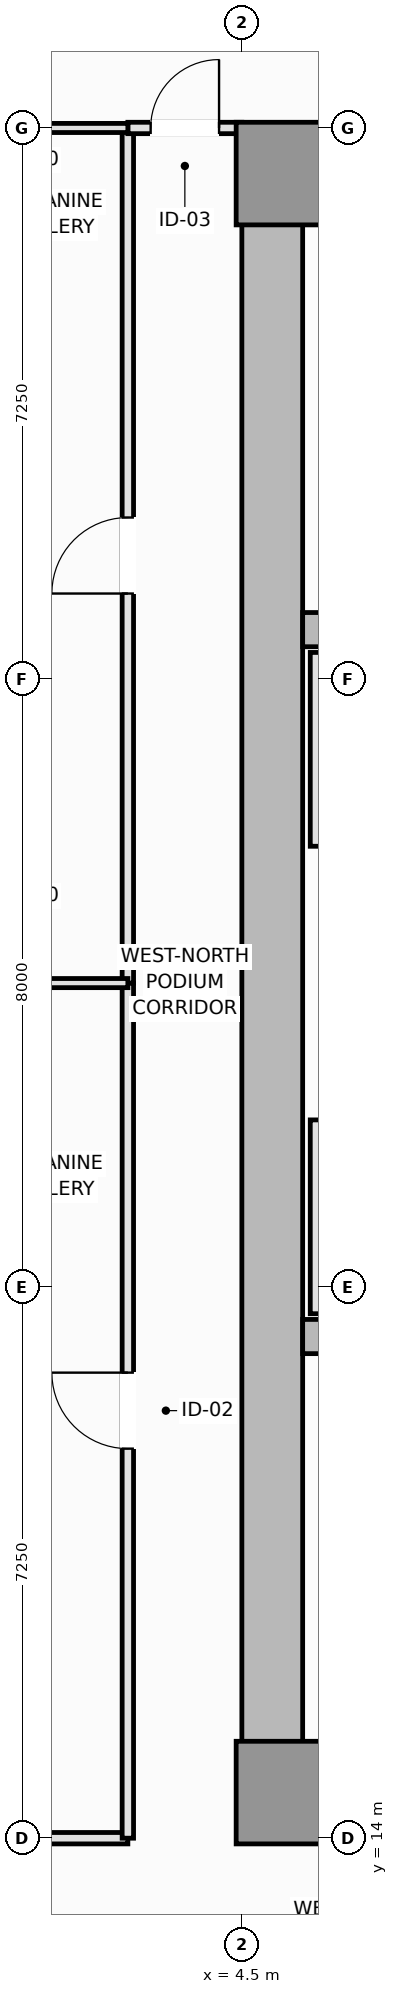
"""IFC4 building model, lengths in metres.
Left out: names, types, materials, properties, quantities, classifications, styles, units other than length and angle.
Written with IfcOpenShell. Run it as: python <this file> out.ifc"""

import sys

from ifc_helpers import new_model, si_unit, direction, frame, frame_2d, origin, origin_2d, place, context, subcontext, project, spatial, rectangle, extrude, element, fill, save


model = new_model("IFC4")
c1 = context("Model", 3, precision=1e-05, world=origin(), true_north=direction((0.0, 1.0)))
c2 = subcontext(c1, "Body", "Model", "MODEL_VIEW")
j1 = project(units=[si_unit("LENGTHUNIT", "METRE"), si_unit("PLANEANGLEUNIT", "RADIAN")], contexts=[c1])
p1 = place(None, origin())
s1 = spatial("IfcSite", under=j1, at=p1, CompositionType="ELEMENT")
p2 = place(p1, origin())
s2 = spatial("IfcBuilding", under=s1, at=p2, CompositionType="ELEMENT")
p3 = place(p2, frame((0.0, 0.0, 10.8)))
s3 = spatial("IfcBuildingStorey", under=s2, at=p3, CompositionType="ELEMENT", Elevation=10.8)
for number, where, z_axis, x_axis in (
    (1, (4.5, 14.4, 0.0), (0.0, 0.0, 1.0), (1.0, 0.0, 0.0)),
    (2, (4.5, 36.1, 0.0), (0.0, 0.0, 1.0), (1.0, 0.0, 0.0)),
):
    element("IfcWall", number, at=place(p3, frame(where, z_axis=z_axis, x_axis=x_axis)), inside=s3, PredefinedType="SHEAR", context=c2, shape_type="SweptSolid", body=[
        extrude(rectangle(XDim=13.5, YDim=0.8, at=frame_2d((6.75, 0.0))), origin(), (0.0, 0.0, 1.0), 4.8),
    ])
p4 = place(p3, frame((4.9, 14.8, 0.0), z_axis=(0.0, 0.0, 1.0), x_axis=(0.0, 1.0, 0.0)))
e3 = element("IfcWall", 3, at=p4, inside=s3, PredefinedType="SHEAR", context=c2, shape_type="SweptSolid", body=[
    extrude(rectangle(XDim=20.9, YDim=0.8, at=frame_2d((10.45, 0.0))), origin(), (0.0, 0.0, 1.0), 4.8),
])
for number, where, z_axis, x_axis in (
    (4, (5.3, 20.6, 0.0), (0.0, 0.0, 1.0), (1.0, 0.0, 0.0)),
    (5, (5.3, 29.9, 0.0), (0.0, 0.0, 1.0), (1.0, 0.0, 0.0)),
):
    element("IfcWall", number, at=place(p3, frame(where, z_axis=z_axis, x_axis=x_axis)), inside=s3, PredefinedType="SHEAR", context=c2, shape_type="SweptSolid", body=[
        extrude(rectangle(XDim=11.9, YDim=0.45, at=frame_2d((5.95, 0.0))), origin(), (0.0, 0.0, 1.0), 4.8),
    ])
for number, where, z_axis, x_axis in (
    (6, (5.1, 14.6, 0.0), (0.0, 0.0, 1.0), (1.0, 0.0, 0.0)),
    (7, (5.1, 35.9, 0.0), (0.0, 0.0, 1.0), (1.0, 0.0, 0.0)),
):
    element("IfcColumn", number, at=place(p3, frame(where, z_axis=z_axis, x_axis=x_axis)), inside=s3, PredefinedType="PILASTER", context=c2, shape_type="SweptSolid", body=[
        extrude(rectangle(XDim=1.35, YDim=1.35, at=origin_2d()), origin(), (0.0, 0.0, 1.0), 4.8),
    ])
for number, where, z_axis, x_axis in (
    (8, (5.475, 20.9, 0.0), (0.0, 0.0, 1.0), (0.0, 1.0, 0.0)),
    (9, (5.475, 27.05, 0.0), (0.0, 0.0, 1.0), (0.0, 1.0, 0.0)),
):
    element("IfcWall", number, at=place(p3, frame(where, z_axis=z_axis, x_axis=x_axis)), inside=s3, PredefinedType="PARTITIONING", context=c2, shape_type="SweptSolid", body=[
        extrude(rectangle(XDim=2.55, YDim=0.15, at=frame_2d((1.275, 0.0))), origin(), (0.0, 0.0, 1.0), 4.6),
    ])
p5 = place(p3, frame((0.2, 14.0, 0.0), z_axis=(0.0, 0.0, 1.0), x_axis=(1.0, 0.0, 0.0)))
e10 = element("IfcWall", 10, at=p5, inside=s3, PredefinedType="PARTITIONING", context=c2, shape_type="SweptSolid", body=[
    extrude(rectangle(XDim=2.8, YDim=0.15, at=frame_2d((1.4, 0.0))), origin(), (0.0, 0.0, 1.0), 4.6),
])
p6 = place(p3, frame((3.0, 14.0, 0.0), z_axis=(0.0, 0.0, 1.0), x_axis=(0.0, 1.0, 0.0)))
e11 = element("IfcWall", 11, at=p6, inside=s3, PredefinedType="PARTITIONING", context=c2, shape_type="SweptSolid", body=[
    extrude(rectangle(XDim=11.25, YDim=0.15, at=frame_2d((5.625, 0.0))), origin(), (0.0, 0.0, 1.0), 4.6),
])
p7 = place(p6, frame((5.125, 0.0, 0.0)))
e12 = element("IfcOpeningElement", 12, at=p7, cuts=e11, PredefinedType="OPENING", context=c2, shape_type="SweptSolid", body=[
    extrude(rectangle(XDim=1.0, YDim=2.15, at=frame_2d((0.5, 1.075))), frame((0.0, 0.085, 0.0), z_axis=(0.0, -1.0, 0.0), x_axis=(1.0, 0.0, 0.0)), (0.0, 0.0, 1.0), 0.17),
])
p8 = place(p3, frame((3.0, 25.25, 0.0), z_axis=(0.0, 0.0, 1.0), x_axis=(0.0, 1.0, 0.0)))
e13 = element("IfcWall", 13, at=p8, inside=s3, PredefinedType="PARTITIONING", context=c2, shape_type="SweptSolid", body=[
    extrude(rectangle(XDim=11.25, YDim=0.15, at=frame_2d((5.625, 0.0))), origin(), (0.0, 0.0, 1.0), 4.6),
])
p9 = place(p8, frame((5.125, 0.0, 0.0)))
e14 = element("IfcOpeningElement", 14, at=p9, cuts=e13, PredefinedType="OPENING", context=c2, shape_type="SweptSolid", body=[
    extrude(rectangle(XDim=1.0, YDim=2.15, at=frame_2d((0.5, 1.075))), frame((0.0, 0.085, 0.0), z_axis=(0.0, -1.0, 0.0), x_axis=(1.0, 0.0, 0.0)), (0.0, 0.0, 1.0), 0.17),
])
p10 = place(p3, frame((3.0, 36.5, 0.0), z_axis=(0.0, 0.0, 1.0), x_axis=(1.0, 0.0, 0.0)))
e15 = element("IfcWall", 15, at=p10, inside=s3, PredefinedType="PARTITIONING", context=c2, shape_type="SweptSolid", body=[
    extrude(rectangle(XDim=1.5, YDim=0.15, at=frame_2d((0.75, 0.0))), origin(), (0.0, 0.0, 1.0), 4.6),
])
p11 = place(p10, frame((0.3, 0.0, 0.0)))
e16 = element("IfcOpeningElement", 16, at=p11, cuts=e15, PredefinedType="OPENING", context=c2, shape_type="SweptSolid", body=[
    extrude(rectangle(XDim=0.9, YDim=2.1, at=frame_2d((0.45, 1.05))), frame((0.0, 0.085, 0.0), z_axis=(0.0, -1.0, 0.0), x_axis=(1.0, 0.0, 0.0)), (0.0, 0.0, 1.0), 0.17),
])
p12 = place(p3, frame((0.2, 25.25, 0.0), z_axis=(0.0, 0.0, 1.0), x_axis=(1.0, 0.0, 0.0)))
e17 = element("IfcWall", 17, at=p12, inside=s3, PredefinedType="PARTITIONING", context=c2, shape_type="SweptSolid", body=[
    extrude(rectangle(XDim=2.8, YDim=0.12, at=frame_2d((1.4, 0.0))), origin(), (0.0, 0.0, 1.0), 3.8),
])
p13 = place(p3, frame((0.2, 36.5, 0.0), z_axis=(0.0, 0.0, 1.0), x_axis=(1.0, 0.0, 0.0)))
e18 = element("IfcWall", 18, at=p13, inside=s3, PredefinedType="PARTITIONING", context=c2, shape_type="SweptSolid", body=[
    extrude(rectangle(XDim=2.8, YDim=0.12, at=frame_2d((1.4, 0.0))), origin(), (0.0, 0.0, 1.0), 4.6),
])
p14 = place(p7, origin())
e19 = element("IfcDoor", 19, at=p14, inside=s3, OperationType="SINGLE_SWING_RIGHT", PredefinedType="DOOR", context=c2, shape_type="SweptSolid", body=[
    extrude(rectangle(XDim=1.0, YDim=2.15, at=frame_2d((0.5, 1.075))), frame((0.0, 0.025, 0.0), z_axis=(0.0, -1.0, 0.0), x_axis=(1.0, 0.0, 0.0)), (0.0, 0.0, 1.0), 0.05),
])
fill(e12, e19)
p15 = place(p9, origin())
e20 = element("IfcDoor", 20, at=p15, inside=s3, OperationType="SINGLE_SWING_LEFT", PredefinedType="DOOR", context=c2, shape_type="SweptSolid", body=[
    extrude(rectangle(XDim=1.0, YDim=2.15, at=frame_2d((0.5, 1.075))), frame((0.0, 0.025, 0.0), z_axis=(0.0, -1.0, 0.0), x_axis=(1.0, 0.0, 0.0)), (0.0, 0.0, 1.0), 0.05),
])
fill(e14, e20)
p16 = place(p11, origin())
e21 = element("IfcDoor", 21, at=p16, inside=s3, OperationType="SINGLE_SWING_RIGHT", PredefinedType="DOOR", context=c2, shape_type="SweptSolid", body=[
    extrude(rectangle(XDim=0.9, YDim=2.1, at=frame_2d((0.45, 1.05))), frame((0.0, 0.025, 0.0), z_axis=(0.0, -1.0, 0.0), x_axis=(1.0, 0.0, 0.0)), (0.0, 0.0, 1.0), 0.05),
])
fill(e16, e21)
save(model, sys.argv[1])
